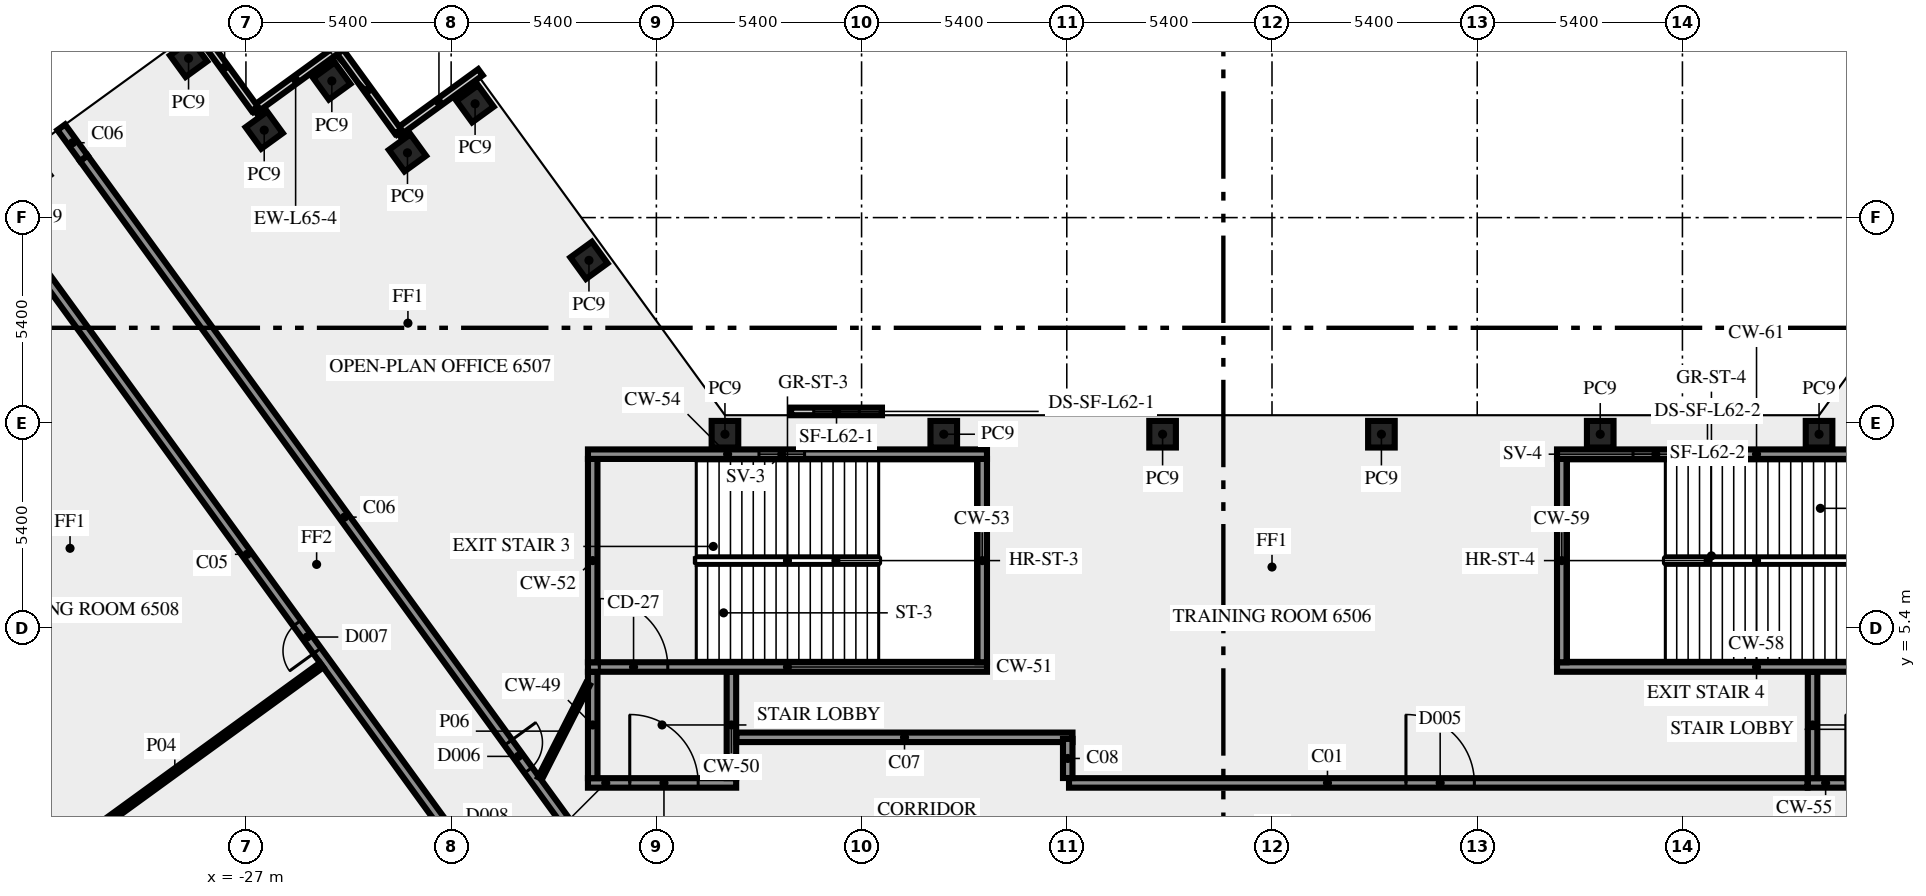
"""IFC4 building model, lengths in metres.
Left out: names, types, materials, properties, quantities, classifications, styles, units other than length and angle.
Written with IfcOpenShell. Run it as: python <this file> out.ifc"""

import sys

from ifc_helpers import new_model, si_unit, direction, frame, frame_2d, origin, origin_2d, place, context, subcontext, project, spatial, rectangle, extrude, element, fill, save


model = new_model("IFC4")
c1 = context("Model", 3, precision=1e-05, world=origin(), true_north=direction((0.0, 1.0)))
c2 = subcontext(c1, "Body", "Model", "MODEL_VIEW")
j1 = project(units=[si_unit("LENGTHUNIT", "METRE"), si_unit("PLANEANGLEUNIT", "RADIAN")], contexts=[c1])
p1 = place(None, origin())
s1 = spatial("IfcSite", under=j1, at=p1, CompositionType="ELEMENT")
p2 = place(p1, origin())
s2 = spatial("IfcBuilding", under=s1, at=p2, CompositionType="ELEMENT")
p3 = place(p2, frame((0.0, 0.0, 281.0)))
s3 = spatial("IfcBuildingStorey", under=s2, at=p3, CompositionType="ELEMENT", Elevation=281.0)
for number, where, z_axis, x_axis in (
    (1, (-17.974, 15.075, 0.0), (0.0, 0.0, 1.0), (-0.588, 0.809, 0.0)),
    (2, (-20.97, 19.195, 0.0), (0.0, 0.0, 1.0), (-0.588, 0.809, 0.0)),
    (3, (-22.749, 17.904, 0.0), (0.0, 0.0, 1.0), (-0.588, 0.809, 0.0)),
    (4, (-24.74, 19.795, 0.0), (0.0, 0.0, 1.0), (-0.588, 0.809, 0.0)),
    (5, (-26.519, 18.5, 0.0), (0.0, 0.0, 1.0), (-0.588, 0.809, 0.0)),
    (6, (-28.51, 20.39, 0.0), (0.0, 0.0, 1.0), (-0.809, -0.588, 0.0)),
    (7, (14.395, 10.5, 0.0), (0.0, 0.0, 1.0), (-1.0, 0.0, 0.0)),
    (8, (8.637, 10.5, 0.0), (0.0, 0.0, 1.0), (-1.0, 0.0, 0.0)),
    (9, (2.879, 10.5, 0.0), (0.0, 0.0, 1.0), (-1.0, 0.0, 0.0)),
    (10, (-2.879, 10.5, 0.0), (0.0, 0.0, 1.0), (-1.0, 0.0, 0.0)),
    (11, (-8.637, 10.5, 0.0), (0.0, 0.0, 1.0), (-1.0, 0.0, 0.0)),
    (12, (-14.395, 10.5, 0.0), (0.0, 0.0, 1.0), (-1.0, 0.0, 0.0)),
):
    element("IfcColumn", number, at=place(p3, frame(where, z_axis=z_axis, x_axis=x_axis)), inside=s3, PredefinedType="COLUMN", context=c2, shape_type="SweptSolid", body=[
        extrude(rectangle(XDim=0.7, YDim=0.7, at=origin_2d()), origin(), (0.0, 0.0, 1.0), 3.65),
    ])
for number, where, z_axis, x_axis in (
    (13, (-20.829, 20.025, 0.0), (0.0, 0.0, 1.0), (-0.809, -0.588, 0.0)),
    (14, (-22.996, 18.466, 0.0), (0.0, 0.0, 1.0), (-0.588, 0.809, 0.0)),
):
    element("IfcWall", number, at=place(p3, frame(where, z_axis=z_axis, x_axis=x_axis)), inside=s3, PredefinedType="SOLIDWALL", context=c2, shape_type="SweptSolid", body=[
        extrude(rectangle(XDim=2.7, YDim=0.2, at=frame_2d((1.35, 0.0))), origin(), (0.0, 0.0, 1.0), 3.65),
    ])
for number, where, z_axis, x_axis in (
    (15, (-24.6, 20.623, 0.0), (0.0, 0.0, 1.0), (-0.809, -0.588, 0.0)),
    (16, (-26.768, 19.063, 0.0), (0.0, 0.0, 1.0), (-0.588, 0.809, 0.0)),
):
    element("IfcWall", number, at=place(p3, frame(where, z_axis=z_axis, x_axis=x_axis)), inside=s3, PredefinedType="SOLIDWALL", context=c2, shape_type="SweptSolid", body=[
        extrude(rectangle(XDim=2.7, YDim=0.2, at=frame_2d((1.35, 0.0))), origin(), (0.0, 0.0, 1.0), 3.65),
    ])
p4 = place(p3, frame((12.655, 11.1, 0.0), z_axis=(0.0, 0.0, 1.0), x_axis=(-1.0, 0.0, 0.0)))
e17 = element("IfcWall", 17, at=p4, inside=s3, PredefinedType="SOLIDWALL", context=c2, shape_type="SweptSolid", body=[
    extrude(rectangle(XDim=2.392, YDim=0.2, at=frame_2d((1.196, 0.0))), origin(), (0.0, 0.0, 1.0), 3.65),
])
p5 = place(p4, frame((0.596, 0.0, 1.0)))
e18 = element("IfcOpeningElement", 18, at=p5, cuts=e17, PredefinedType="OPENING", context=c2, shape_type="SweptSolid", body=[
    extrude(rectangle(XDim=1.2, YDim=1.2, at=frame_2d((0.6, 0.6))), frame((0.0, 0.11, 0.0), z_axis=(0.0, -1.0, 0.0), x_axis=(1.0, 0.0, 0.0)), (0.0, 0.0, 1.0), 0.22),
])
p6 = place(p3, frame((-10.263, 11.1, 0.0), z_axis=(0.0, 0.0, 1.0), x_axis=(-1.0, 0.0, 0.0)))
e19 = element("IfcWall", 19, at=p6, inside=s3, PredefinedType="SOLIDWALL", context=c2, shape_type="SweptSolid", body=[
    extrude(rectangle(XDim=2.392, YDim=0.2, at=frame_2d((1.196, 0.0))), origin(), (0.0, 0.0, 1.0), 3.65),
])
p7 = place(p6, frame((0.596, 0.0, 1.0)))
e20 = element("IfcOpeningElement", 20, at=p7, cuts=e19, PredefinedType="OPENING", context=c2, shape_type="SweptSolid", body=[
    extrude(rectangle(XDim=1.2, YDim=1.2, at=frame_2d((0.6, 0.6))), frame((0.0, 0.11, 0.0), z_axis=(0.0, -1.0, 0.0), x_axis=(1.0, 0.0, 0.0)), (0.0, 0.0, 1.0), 0.22),
])
p8 = place(p3, frame((-18.0, 1.325, 0.0), z_axis=(0.0, 0.0, 1.0), x_axis=(1.0, 0.0, 0.0)))
e21 = element("IfcWall", 21, at=p8, inside=s3, PredefinedType="SHEAR", context=c2, shape_type="SweptSolid", body=[
    extrude(rectangle(XDim=3.9, YDim=0.25, at=frame_2d((1.95, 0.0))), origin(), (0.0, 0.0, 1.0), 3.65),
])
p9 = place(p8, frame((1.1, 0.0, 0.0)))
e22 = element("IfcOpeningElement", 22, at=p9, cuts=e21, PredefinedType="OPENING", context=c2, shape_type="SweptSolid", body=[
    extrude(rectangle(XDim=1.8, YDim=2.1, at=frame_2d((0.9, 1.05))), frame((0.0, 0.135, 0.0), z_axis=(0.0, -1.0, 0.0), x_axis=(1.0, 0.0, 0.0)), (0.0, 0.0, 1.0), 0.27),
])
for number, where, z_axis, x_axis in (
    (23, (-17.875, 1.45, 0.0), (0.0, 0.0, 1.0), (0.0, 1.0, 0.0)),
    (24, (-14.225, 1.45, 0.0), (0.0, 0.0, 1.0), (0.0, 1.0, 0.0)),
):
    element("IfcWall", number, at=place(p3, frame(where, z_axis=z_axis, x_axis=x_axis)), inside=s3, PredefinedType="SHEAR", context=c2, shape_type="SweptSolid", body=[
        extrude(rectangle(XDim=2.8, YDim=0.25, at=frame_2d((1.4, 0.0))), origin(), (0.0, 0.0, 1.0), 3.65),
    ])
p10 = place(p3, frame((-18.0, 4.375, 0.0), z_axis=(0.0, 0.0, 1.0), x_axis=(1.0, 0.0, 0.0)))
e25 = element("IfcWall", 25, at=p10, inside=s3, PredefinedType="SHEAR", context=c2, shape_type="SweptSolid", body=[
    extrude(rectangle(XDim=10.5, YDim=0.25, at=frame_2d((5.25, 0.0))), origin(), (0.0, 0.0, 1.0), 3.65),
])
p11 = place(p10, frame((0.3, 0.0, 0.0)))
e26 = element("IfcOpeningElement", 26, at=p11, cuts=e25, PredefinedType="OPENING", context=c2, shape_type="SweptSolid", body=[
    extrude(rectangle(XDim=1.8, YDim=2.1, at=frame_2d((0.9, 1.05))), frame((0.0, 0.135, 0.0), z_axis=(0.0, -1.0, 0.0), x_axis=(1.0, 0.0, 0.0)), (0.0, 0.0, 1.0), 0.27),
])
for number, where, z_axis, x_axis in (
    (27, (-17.875, 4.5, 0.0), (0.0, 0.0, 1.0), (0.0, 1.0, 0.0)),
    (28, (-7.625, 4.5, 0.0), (0.0, 0.0, 1.0), (0.0, 1.0, 0.0)),
):
    element("IfcWall", number, at=place(p3, frame(where, z_axis=z_axis, x_axis=x_axis)), inside=s3, PredefinedType="SHEAR", context=c2, shape_type="SweptSolid", body=[
        extrude(rectangle(XDim=5.35, YDim=0.25, at=frame_2d((2.675, 0.0))), origin(), (0.0, 0.0, 1.0), 3.65),
    ])
p12 = place(p3, frame((-18.0, 9.975, 0.0), z_axis=(0.0, 0.0, 1.0), x_axis=(1.0, 0.0, 0.0)))
e29 = element("IfcWall", 29, at=p12, inside=s3, PredefinedType="SHEAR", context=c2, shape_type="SweptSolid", body=[
    extrude(rectangle(XDim=10.5, YDim=0.25, at=frame_2d((5.25, 0.0))), origin(), (0.0, 0.0, 1.0), 3.65),
])
p13 = place(p12, frame((4.5, 0.0, 1.0)))
e30 = element("IfcOpeningElement", 30, at=p13, cuts=e29, PredefinedType="OPENING", context=c2, shape_type="SweptSolid", body=[
    extrude(rectangle(XDim=1.2, YDim=1.2, at=frame_2d((0.6, 0.6))), frame((0.0, 0.135, 0.0), z_axis=(0.0, -1.0, 0.0), x_axis=(1.0, 0.0, 0.0)), (0.0, 0.0, 1.0), 0.27),
])
p14 = place(p3, frame((14.1, 1.325, 0.0), z_axis=(0.0, 0.0, 1.0), x_axis=(1.0, 0.0, 0.0)))
e31 = element("IfcWall", 31, at=p14, inside=s3, PredefinedType="SHEAR", context=c2, shape_type="SweptSolid", body=[
    extrude(rectangle(XDim=3.9, YDim=0.25, at=frame_2d((1.95, 0.0))), origin(), (0.0, 0.0, 1.0), 3.65),
])
p15 = place(p14, frame((1.0, 0.0, 0.0)))
e32 = element("IfcOpeningElement", 32, at=p15, cuts=e31, PredefinedType="OPENING", context=c2, shape_type="SweptSolid", body=[
    extrude(rectangle(XDim=1.8, YDim=2.1, at=frame_2d((0.9, 1.05))), frame((0.0, 0.135, 0.0), z_axis=(0.0, -1.0, 0.0), x_axis=(1.0, 0.0, 0.0)), (0.0, 0.0, 1.0), 0.27),
])
p16 = place(p3, frame((14.225, 1.45, 0.0), z_axis=(0.0, 0.0, 1.0), x_axis=(0.0, 1.0, 0.0)))
e33 = element("IfcWall", 33, at=p16, inside=s3, PredefinedType="SHEAR", context=c2, shape_type="SweptSolid", body=[
    extrude(rectangle(XDim=2.8, YDim=0.25, at=frame_2d((1.4, 0.0))), origin(), (0.0, 0.0, 1.0), 3.65),
])
p17 = place(p3, frame((7.5, 4.375, 0.0), z_axis=(0.0, 0.0, 1.0), x_axis=(1.0, 0.0, 0.0)))
e34 = element("IfcWall", 34, at=p17, inside=s3, PredefinedType="SHEAR", context=c2, shape_type="SweptSolid", body=[
    extrude(rectangle(XDim=10.5, YDim=0.25, at=frame_2d((5.25, 0.0))), origin(), (0.0, 0.0, 1.0), 3.65),
])
p18 = place(p17, frame((8.4, 0.0, 0.0)))
e35 = element("IfcOpeningElement", 35, at=p18, cuts=e34, PredefinedType="OPENING", context=c2, shape_type="SweptSolid", body=[
    extrude(rectangle(XDim=1.8, YDim=2.1, at=frame_2d((0.9, 1.05))), frame((0.0, 0.135, 0.0), z_axis=(0.0, -1.0, 0.0), x_axis=(1.0, 0.0, 0.0)), (0.0, 0.0, 1.0), 0.27),
])
p19 = place(p3, frame((7.625, 4.5, 0.0), z_axis=(0.0, 0.0, 1.0), x_axis=(0.0, 1.0, 0.0)))
e36 = element("IfcWall", 36, at=p19, inside=s3, PredefinedType="SHEAR", context=c2, shape_type="SweptSolid", body=[
    extrude(rectangle(XDim=5.35, YDim=0.25, at=frame_2d((2.675, 0.0))), origin(), (0.0, 0.0, 1.0), 3.65),
])
p20 = place(p3, frame((7.5, 9.975, 0.0), z_axis=(0.0, 0.0, 1.0), x_axis=(1.0, 0.0, 0.0)))
e37 = element("IfcWall", 37, at=p20, inside=s3, PredefinedType="SHEAR", context=c2, shape_type="SweptSolid", body=[
    extrude(rectangle(XDim=10.5, YDim=0.25, at=frame_2d((5.25, 0.0))), origin(), (0.0, 0.0, 1.0), 3.65),
])
p21 = place(p20, frame((2.0, 0.0, 1.0)))
e38 = element("IfcOpeningElement", 38, at=p21, cuts=e37, PredefinedType="OPENING", context=c2, shape_type="SweptSolid", body=[
    extrude(rectangle(XDim=1.2, YDim=1.2, at=frame_2d((0.6, 0.6))), frame((0.0, 0.135, 0.0), z_axis=(0.0, -1.0, 0.0), x_axis=(1.0, 0.0, 0.0)), (0.0, 0.0, 1.0), 0.27),
])
p22 = place(p3, frame((-5.341, 1.325, 0.0), z_axis=(0.0, 0.0, 1.0), x_axis=(1.0, 0.0, 0.0)))
e39 = element("IfcWall", 39, at=p22, inside=s3, PredefinedType="SOLIDWALL", context=c2, shape_type="SweptSolid", body=[
    extrude(rectangle(XDim=19.431, YDim=0.25, at=frame_2d((9.716, 0.0))), origin(), (0.0, 0.0, 1.0), 3.65),
])
p23 = place(p22, frame((8.866, 0.0, 0.0)))
e40 = element("IfcOpeningElement", 40, at=p23, cuts=e39, PredefinedType="OPENING", context=c2, shape_type="SweptSolid", body=[
    extrude(rectangle(XDim=1.8, YDim=2.1, at=frame_2d((0.9, 1.05))), frame((0.0, 0.135, 0.0), z_axis=(0.0, -1.0, 0.0), x_axis=(1.0, 0.0, 0.0)), (0.0, 0.0, 1.0), 0.27),
])
p24 = place(p3, frame((-20.531, -1.523, 0.0), z_axis=(0.0, 0.0, 1.0), x_axis=(-0.587786711753, 0.809015934013, 0.0)))
e41 = element("IfcWall", 41, at=p24, inside=s3, PredefinedType="SOLIDWALL", context=c2, shape_type="SweptSolid", body=[
    extrude(rectangle(XDim=21.911, YDim=0.25, at=frame_2d((10.956, 0.0))), origin(), (0.0, 0.0, 1.0), 3.65),
])
p25 = place(p24, frame((0.533, 0.0, 0.0)))
e42 = element("IfcOpeningElement", 42, at=p25, cuts=e41, PredefinedType="OPENING", context=c2, shape_type="SweptSolid", body=[
    extrude(rectangle(XDim=0.9, YDim=2.1, at=frame_2d((0.45, 1.05))), frame((0.0, 0.135, 0.0), z_axis=(0.0, -1.0, 0.0), x_axis=(1.0, 0.0, 0.0)), (0.0, 0.0, 1.0), 0.27),
])
p26 = place(p24, frame((7.816, 0.0, 0.0)))
e43 = element("IfcOpeningElement", 43, at=p26, cuts=e41, PredefinedType="OPENING", context=c2, shape_type="SweptSolid", body=[
    extrude(rectangle(XDim=0.9, YDim=2.1, at=frame_2d((0.45, 1.05))), frame((0.0, 0.135, 0.0), z_axis=(0.0, -1.0, 0.0), x_axis=(1.0, 0.0, 0.0)), (0.0, 0.0, 1.0), 0.27),
])
p27 = place(p3, frame((-31.267, 17.762, 0.0), z_axis=(0.0, 0.0, 1.0), x_axis=(0.587787966774, -0.809015022181, 0.0)))
e44 = element("IfcWall", 44, at=p27, inside=s3, PredefinedType="SOLIDWALL", context=c2, shape_type="SweptSolid", body=[
    extrude(rectangle(XDim=23.345, YDim=0.25, at=frame_2d((11.672, 0.0))), origin(), (0.0, 0.0, 1.0), 3.65),
])
p28 = place(p27, frame((19.004, 0.0, 0.0)))
e45 = element("IfcOpeningElement", 45, at=p28, cuts=e44, PredefinedType="OPENING", context=c2, shape_type="SweptSolid", body=[
    extrude(rectangle(XDim=0.9, YDim=2.1, at=frame_2d((0.45, 1.05))), frame((0.0, 0.135, 0.0), z_axis=(0.0, -1.0, 0.0), x_axis=(1.0, 0.0, 0.0)), (0.0, 0.0, 1.0), 0.27),
])
p29 = place(p3, frame((-14.09, 2.525, 0.0), z_axis=(0.0, 0.0, 1.0), x_axis=(1.0, 0.0, 0.0)))
e46 = element("IfcWall", 46, at=p29, inside=s3, PredefinedType="SOLIDWALL", context=c2, shape_type="SweptSolid", body=[
    extrude(rectangle(XDim=8.84, YDim=0.25, at=frame_2d((4.42, 0.0))), origin(), (0.0, 0.0, 1.0), 3.65),
])
p30 = place(p3, frame((-5.375, 2.484, 0.0), z_axis=(0.0, 0.0, 1.0), x_axis=(0.0, -1.0, 0.0)))
e47 = element("IfcWall", 47, at=p30, inside=s3, PredefinedType="SOLIDWALL", context=c2, shape_type="SweptSolid", body=[
    extrude(rectangle(XDim=1.03, YDim=0.25, at=frame_2d((0.515, 0.0))), origin(), (0.0, 0.0, 1.0), 3.65),
])
p31 = place(p3, frame((-25.008, 4.427, 0.0), z_axis=(0.0, 0.0, 1.0), x_axis=(-0.808994684961, -0.587815957341, 0.0)))
e48 = element("IfcWall", 48, at=p31, inside=s3, PredefinedType="PARTITIONING", context=c2, shape_type="SweptSolid", body=[
    extrude(rectangle(XDim=9.55, YDim=0.15, at=frame_2d((4.775, 0.0))), origin(), (0.0, 0.0, 1.0), 2.95),
])
p32 = place(p3, frame((-19.261, 1.45, 0.0), z_axis=(0.0, 0.0, 1.0), x_axis=(0.453950796792, 0.891026752736, 0.0)))
e49 = element("IfcWall", 49, at=p32, inside=s3, PredefinedType="PARTITIONING", context=c2, shape_type="SweptSolid", body=[
    extrude(rectangle(XDim=2.778, YDim=0.12, at=frame_2d((1.389, 0.0))), origin(), (0.0, 0.0, 1.0), 3.65),
])
p33 = place(p3, frame((-31.267, 17.762, 0.0), z_axis=(0.0, 0.0, 1.0), x_axis=(-0.587840411638, 0.808976915892, 0.0)))
e50 = element("IfcWall", 50, at=p33, inside=s3, PredefinedType="SOLIDWALL", context=c2, shape_type="SweptSolid", body=[
    extrude(rectangle(XDim=1.008, YDim=0.25, at=frame_2d((0.504, 0.0))), origin(), (0.0, 0.0, 1.0), 2.95),
])
p34 = place(p5, origin())
e51 = element("IfcWindow", 51, at=p34, inside=s3, PartitioningType="SINGLE_PANEL", PredefinedType="WINDOW", context=c2, shape_type="SweptSolid", body=[
    extrude(rectangle(XDim=1.2, YDim=1.2, at=frame_2d((0.6, 0.6))), frame((0.0, 0.03, 0.0), z_axis=(0.0, -1.0, 0.0), x_axis=(1.0, 0.0, 0.0)), (0.0, 0.0, 1.0), 0.06),
])
fill(e18, e51)
p35 = place(p7, origin())
e52 = element("IfcWindow", 52, at=p35, inside=s3, PartitioningType="SINGLE_PANEL", PredefinedType="WINDOW", context=c2, shape_type="SweptSolid", body=[
    extrude(rectangle(XDim=1.2, YDim=1.2, at=frame_2d((0.6, 0.6))), frame((0.0, 0.03, 0.0), z_axis=(0.0, -1.0, 0.0), x_axis=(1.0, 0.0, 0.0)), (0.0, 0.0, 1.0), 0.06),
])
fill(e20, e52)
p36 = place(p9, origin())
e53 = element("IfcDoor", 53, at=p36, inside=s3, OperationType="DOUBLE_DOOR_SINGLE_SWING", PredefinedType="DOOR", context=c2, shape_type="SweptSolid", body=[
    extrude(rectangle(XDim=1.8, YDim=2.1, at=frame_2d((0.9, 1.05))), frame((0.0, 0.025, 0.0), z_axis=(0.0, -1.0, 0.0), x_axis=(1.0, 0.0, 0.0)), (0.0, 0.0, 1.0), 0.05),
])
fill(e22, e53)
p37 = place(p11, origin())
e54 = element("IfcDoor", 54, at=p37, inside=s3, OperationType="DOUBLE_DOOR_SINGLE_SWING", PredefinedType="DOOR", context=c2, shape_type="SweptSolid", body=[
    extrude(rectangle(XDim=1.8, YDim=2.1, at=frame_2d((0.9, 1.05))), frame((0.0, 0.025, 0.0), z_axis=(0.0, -1.0, 0.0), x_axis=(1.0, 0.0, 0.0)), (0.0, 0.0, 1.0), 0.05),
])
fill(e26, e54)
p38 = place(p13, origin())
e55 = element("IfcWindow", 55, at=p38, inside=s3, PartitioningType="SINGLE_PANEL", PredefinedType="WINDOW", context=c2, shape_type="SweptSolid", body=[
    extrude(rectangle(XDim=1.2, YDim=1.2, at=frame_2d((0.6, 0.6))), frame((0.0, 0.03, 0.0), z_axis=(0.0, -1.0, 0.0), x_axis=(1.0, 0.0, 0.0)), (0.0, 0.0, 1.0), 0.06),
])
fill(e30, e55)
p39 = place(p15, origin())
e56 = element("IfcDoor", 56, at=p39, inside=s3, OperationType="DOUBLE_DOOR_SINGLE_SWING", PredefinedType="DOOR", context=c2, shape_type="SweptSolid", body=[
    extrude(rectangle(XDim=1.8, YDim=2.1, at=frame_2d((0.9, 1.05))), frame((0.0, 0.025, 0.0), z_axis=(0.0, -1.0, 0.0), x_axis=(1.0, 0.0, 0.0)), (0.0, 0.0, 1.0), 0.05),
])
fill(e32, e56)
p40 = place(p21, origin())
e57 = element("IfcWindow", 57, at=p40, inside=s3, PartitioningType="SINGLE_PANEL", PredefinedType="WINDOW", context=c2, shape_type="SweptSolid", body=[
    extrude(rectangle(XDim=1.2, YDim=1.2, at=frame_2d((0.6, 0.6))), frame((0.0, 0.03, 0.0), z_axis=(0.0, -1.0, 0.0), x_axis=(1.0, 0.0, 0.0)), (0.0, 0.0, 1.0), 0.06),
])
fill(e38, e57)
p41 = place(p28, origin())
e58 = element("IfcDoor", 58, at=p41, inside=s3, OperationType="SINGLE_SWING_RIGHT", PredefinedType="DOOR", context=c2, shape_type="SweptSolid", body=[
    extrude(rectangle(XDim=0.9, YDim=2.1, at=frame_2d((0.45, 1.05))), frame((0.0, 0.025, 0.0), z_axis=(0.0, -1.0, 0.0), x_axis=(1.0, 0.0, 0.0)), (0.0, 0.0, 1.0), 0.05),
])
fill(e45, e58)
p42 = place(p26, origin())
e59 = element("IfcDoor", 59, at=p42, inside=s3, OperationType="SINGLE_SWING_LEFT", PredefinedType="DOOR", context=c2, shape_type="SweptSolid", body=[
    extrude(rectangle(XDim=0.9, YDim=2.1, at=frame_2d((0.45, 1.05))), frame((0.0, 0.025, 0.0), z_axis=(0.0, -1.0, 0.0), x_axis=(1.0, 0.0, 0.0)), (0.0, 0.0, 1.0), 0.05),
])
fill(e43, e59)
p43 = place(p23, origin())
e60 = element("IfcDoor", 60, at=p43, inside=s3, OperationType="DOUBLE_DOOR_SINGLE_SWING", PredefinedType="DOOR", context=c2, shape_type="SweptSolid", body=[
    extrude(rectangle(XDim=1.8, YDim=2.1, at=frame_2d((0.9, 1.05))), frame((0.0, 0.025, 0.0), z_axis=(0.0, -1.0, 0.0), x_axis=(1.0, 0.0, 0.0)), (0.0, 0.0, 1.0), 0.05),
])
fill(e40, e60)
save(model, sys.argv[1])
